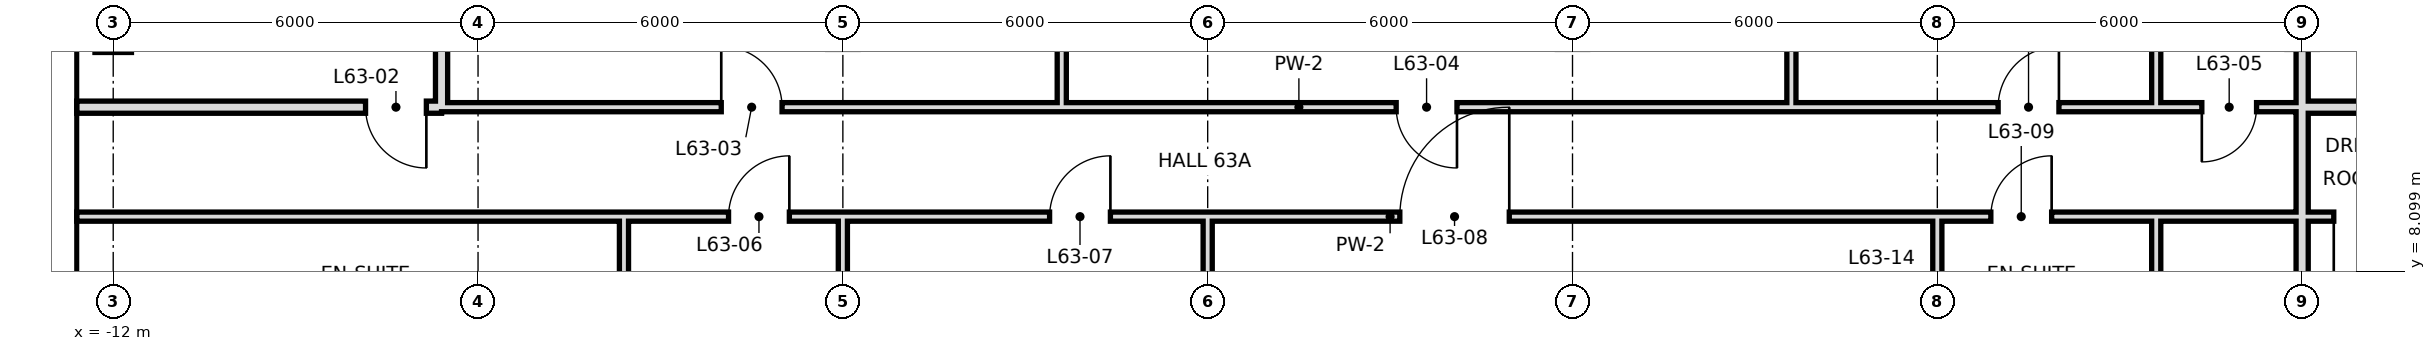
"""IFC4 building model, lengths in metres.
Left out: names, types, materials, properties, quantities, classifications, styles, units other than length and angle.
Written with IfcOpenShell. Run it as: python <this file> out.ifc"""

import sys

from ifc_helpers import new_model, si_unit, direction, frame, frame_2d, origin, place, context, subcontext, project, spatial, rectangle, extrude, element, fill, save


model = new_model("IFC4")
c1 = context("Model", 3, precision=1e-05, world=origin(), true_north=direction((0.0, 1.0)))
c2 = subcontext(c1, "Body", "Model", "MODEL_VIEW")
j1 = project(units=[si_unit("LENGTHUNIT", "METRE"), si_unit("PLANEANGLEUNIT", "RADIAN")], contexts=[c1])
p1 = place(None, origin())
s1 = spatial("IfcSite", under=j1, at=p1, CompositionType="ELEMENT")
p2 = place(p1, origin())
s2 = spatial("IfcBuilding", under=s1, at=p2, CompositionType="ELEMENT")
p3 = place(p2, frame((0.0, 0.0, 266.6)))
s3 = spatial("IfcBuildingStorey", under=s2, at=p3, CompositionType="ELEMENT", Elevation=266.6)
p4 = place(p3, frame((-3.6, 6.0, 0.0), z_axis=(0.0, 0.0, 1.0), x_axis=(0.0, 1.0, 0.0)))
e1 = element("IfcWall", 1, at=p4, inside=s3, PredefinedType="PARTITIONING", context=c2, shape_type="SweptSolid", body=[
    extrude(rectangle(XDim=3.0, YDim=0.15, at=frame_2d((1.5, 0.0))), origin(), (0.0, 0.0, 1.0), 3.42),
])
p5 = place(p3, frame((-6.6, 10.8, 0.0), z_axis=(0.0, 0.0, 1.0), x_axis=(0.0, 1.0, 0.0)))
e2 = element("IfcWall", 2, at=p5, inside=s3, PredefinedType="SOLIDWALL", context=c2, shape_type="SweptSolid", body=[
    extrude(rectangle(XDim=7.2, YDim=0.2, at=frame_2d((3.6, 0.0))), origin(), (0.0, 0.0, 1.0), 2.72),
])
p6 = place(p3, frame((0.0, 0.0, 0.0), z_axis=(0.0, 0.0, 1.0), x_axis=(0.0, 1.0, 0.0)))
e3 = element("IfcWall", 3, at=p6, inside=s3, PredefinedType="PARTITIONING", context=c2, shape_type="SweptSolid", body=[
    extrude(rectangle(XDim=9.0, YDim=0.15, at=frame_2d((4.5, 0.0))), origin(), (0.0, 0.0, 1.0), 2.72),
])
p7 = place(p3, frame((15.6, 10.8, 0.0), z_axis=(0.0, 0.0, 1.0), x_axis=(0.0, 1.0, 0.0)))
e4 = element("IfcWall", 4, at=p7, inside=s3, PredefinedType="PARTITIONING", context=c2, shape_type="SweptSolid", body=[
    extrude(rectangle(XDim=7.9, YDim=0.15, at=frame_2d((3.95, 0.0))), origin(), (0.0, 0.0, 1.0), 3.42),
])
p8 = place(p3, frame((18.0, -0.6, 0.0), z_axis=(0.0, 0.0, 1.0), x_axis=(0.0, 1.0, 0.0)))
e5 = element("IfcWall", 5, at=p8, inside=s3, PredefinedType="PARTITIONING", context=c2, shape_type="SweptSolid", body=[
    extrude(rectangle(XDim=9.6, YDim=0.15, at=frame_2d((4.8, 0.0))), origin(), (0.0, 0.0, 1.0), 2.72),
])
p9 = place(p3, frame((21.6, 6.0, 0.0), z_axis=(0.0, 0.0, 1.0), x_axis=(0.0, 1.0, 0.0)))
e6 = element("IfcWall", 6, at=p9, inside=s3, PredefinedType="PARTITIONING", context=c2, shape_type="SweptSolid", body=[
    extrude(rectangle(XDim=3.0, YDim=0.15, at=frame_2d((1.5, 0.0))), origin(), (0.0, 0.0, 1.0), 3.42),
])
p10 = place(p3, frame((21.6, 10.8, 0.0), z_axis=(0.0, 0.0, 1.0), x_axis=(0.0, 1.0, 0.0)))
e7 = element("IfcWall", 7, at=p10, inside=s3, PredefinedType="PARTITIONING", context=c2, shape_type="SweptSolid", body=[
    extrude(rectangle(XDim=7.9, YDim=0.15, at=frame_2d((3.95, 0.0))), origin(), (0.0, 0.0, 1.0), 3.42),
])
p11 = place(p3, frame((24.0, 10.8, 0.0), z_axis=(0.0, 0.0, 1.0), x_axis=(0.0, 1.0, 0.0)))
e8 = element("IfcWall", 8, at=p11, inside=s3, PredefinedType="SOLIDWALL", context=c2, shape_type="SweptSolid", body=[
    extrude(rectangle(XDim=7.9, YDim=0.2, at=frame_2d((3.95, 0.0))), origin(), (0.0, 0.0, 1.0), 2.72),
])
p12 = place(p3, frame((24.0, 0.0, 0.0), z_axis=(0.0, 0.0, 1.0), x_axis=(0.0, 1.0, 0.0)))
e9 = element("IfcWall", 9, at=p12, inside=s3, PredefinedType="SOLIDWALL", context=c2, shape_type="SweptSolid", body=[
    extrude(rectangle(XDim=10.8, YDim=0.2, at=frame_2d((5.4, 0.0))), origin(), (0.0, 0.0, 1.0), 2.72),
])
p13 = place(p3, frame((3.6, 10.8, 0.0), z_axis=(0.0, 0.0, 1.0), x_axis=(0.0, 1.0, 0.0)))
e10 = element("IfcWall", 10, at=p13, inside=s3, PredefinedType="PARTITIONING", context=c2, shape_type="SweptSolid", body=[
    extrude(rectangle(XDim=7.9, YDim=0.15, at=frame_2d((3.95, 0.0))), origin(), (0.0, 0.0, 1.0), 3.42),
])
p14 = place(p3, frame((6.0, -0.6, 0.0), z_axis=(0.0, 0.0, 1.0), x_axis=(0.0, 1.0, 0.0)))
e11 = element("IfcWall", 11, at=p14, inside=s3, PredefinedType="PARTITIONING", context=c2, shape_type="SweptSolid", body=[
    extrude(rectangle(XDim=9.6, YDim=0.15, at=frame_2d((4.8, 0.0))), origin(), (0.0, 0.0, 1.0), 2.72),
])
p15 = place(p3, frame((-12.6, 10.8, 0.0), z_axis=(0.0, 0.0, 1.0), x_axis=(1.0, 0.0, 0.0)))
e12 = element("IfcWall", 12, at=p15, inside=s3, PredefinedType="SOLIDWALL", context=c2, shape_type="SweptSolid", body=[
    extrude(rectangle(XDim=6.0, YDim=0.2, at=frame_2d((3.0, 0.0))), origin(), (0.0, 0.0, 1.0), 2.97),
])
p16 = place(p15, frame((4.75, 0.0, 0.0)))
e13 = element("IfcOpeningElement", 13, at=p16, cuts=e12, PredefinedType="OPENING", context=c2, shape_type="SweptSolid", body=[
    extrude(rectangle(XDim=1.0, YDim=2.4, at=frame_2d((0.5, 1.2))), frame((0.0, 0.11, 0.0), z_axis=(0.0, -1.0, 0.0), x_axis=(1.0, 0.0, 0.0)), (0.0, 0.0, 1.0), 0.22),
])
p17 = place(p3, frame((24.0, 10.8, 0.0), z_axis=(0.0, 0.0, 1.0), x_axis=(1.0, 0.0, 0.0)))
e14 = element("IfcWall", 14, at=p17, inside=s3, PredefinedType="SOLIDWALL", context=c2, shape_type="SweptSolid", body=[
    extrude(rectangle(XDim=3.6, YDim=0.2, at=frame_2d((1.8, 0.0))), origin(), (0.0, 0.0, 1.0), 2.72),
])
p18 = place(p17, frame((1.3, 0.0, 0.0)))
e15 = element("IfcOpeningElement", 15, at=p18, cuts=e14, PredefinedType="OPENING", context=c2, shape_type="SweptSolid", body=[
    extrude(rectangle(XDim=1.0, YDim=2.4, at=frame_2d((0.5, 1.2))), frame((0.0, 0.11, 0.0), z_axis=(0.0, -1.0, 0.0), x_axis=(1.0, 0.0, 0.0)), (0.0, 0.0, 1.0), 0.22),
])
p19 = place(p3, frame((-6.6, 10.8, 0.0), z_axis=(0.0, 0.0, 1.0), x_axis=(1.0, 0.0, 0.0)))
e16 = element("IfcWall", 16, at=p19, inside=s3, PredefinedType="PARTITIONING", context=c2, shape_type="SweptSolid", body=[
    extrude(rectangle(XDim=28.2, YDim=0.15, at=frame_2d((14.1, 0.0))), origin(), (0.0, 0.0, 1.0), 3.42),
])
p20 = place(p19, frame((25.6, 0.0, 0.0)))
e17 = element("IfcOpeningElement", 17, at=p20, cuts=e16, PredefinedType="OPENING", context=c2, shape_type="SweptSolid", body=[
    extrude(rectangle(XDim=1.0, YDim=2.4, at=frame_2d((0.5, 1.2))), frame((0.0, 0.085, 0.0), z_axis=(0.0, -1.0, 0.0), x_axis=(1.0, 0.0, 0.0)), (0.0, 0.0, 1.0), 0.17),
])
p21 = place(p19, frame((4.6, 0.0, 0.0)))
e18 = element("IfcOpeningElement", 18, at=p21, cuts=e16, PredefinedType="OPENING", context=c2, shape_type="SweptSolid", body=[
    extrude(rectangle(XDim=1.0, YDim=2.4, at=frame_2d((0.5, 1.2))), frame((0.0, 0.085, 0.0), z_axis=(0.0, -1.0, 0.0), x_axis=(1.0, 0.0, 0.0)), (0.0, 0.0, 1.0), 0.17),
])
p22 = place(p19, frame((15.7, 0.0, 0.0)))
e19 = element("IfcOpeningElement", 19, at=p22, cuts=e16, PredefinedType="OPENING", context=c2, shape_type="SweptSolid", body=[
    extrude(rectangle(XDim=1.0, YDim=2.4, at=frame_2d((0.5, 1.2))), frame((0.0, 0.085, 0.0), z_axis=(0.0, -1.0, 0.0), x_axis=(1.0, 0.0, 0.0)), (0.0, 0.0, 1.0), 0.17),
])
p23 = place(p3, frame((21.6, 10.8, 0.0), z_axis=(0.0, 0.0, 1.0), x_axis=(1.0, 0.0, 0.0)))
e20 = element("IfcWall", 20, at=p23, inside=s3, PredefinedType="PARTITIONING", context=c2, shape_type="SweptSolid", body=[
    extrude(rectangle(XDim=2.4, YDim=0.15, at=frame_2d((1.2, 0.0))), origin(), (0.0, 0.0, 1.0), 3.42),
])
p24 = place(p23, frame((0.75, 0.0, 0.0)))
e21 = element("IfcOpeningElement", 21, at=p24, cuts=e20, PredefinedType="OPENING", context=c2, shape_type="SweptSolid", body=[
    extrude(rectangle(XDim=0.9, YDim=2.4, at=frame_2d((0.45, 1.2))), frame((0.0, 0.085, 0.0), z_axis=(0.0, -1.0, 0.0), x_axis=(1.0, 0.0, 0.0)), (0.0, 0.0, 1.0), 0.17),
])
p25 = place(p3, frame((-3.6, 9.0, 0.0), z_axis=(0.0, 0.0, 1.0), x_axis=(1.0, 0.0, 0.0)))
e22 = element("IfcWall", 22, at=p25, inside=s3, PredefinedType="PARTITIONING", context=c2, shape_type="SweptSolid", body=[
    extrude(rectangle(XDim=25.2, YDim=0.15, at=frame_2d((12.6, 0.0))), origin(), (0.0, 0.0, 1.0), 3.42),
])
p26 = place(p25, frame((1.72, 0.0, 0.0)))
e23 = element("IfcOpeningElement", 23, at=p26, cuts=e22, PredefinedType="OPENING", context=c2, shape_type="SweptSolid", body=[
    extrude(rectangle(XDim=1.0, YDim=2.4, at=frame_2d((0.5, 1.2))), frame((0.0, 0.085, 0.0), z_axis=(0.0, -1.0, 0.0), x_axis=(1.0, 0.0, 0.0)), (0.0, 0.0, 1.0), 0.17),
])
p27 = place(p25, frame((7.0, 0.0, 0.0)))
e24 = element("IfcOpeningElement", 24, at=p27, cuts=e22, PredefinedType="OPENING", context=c2, shape_type="SweptSolid", body=[
    extrude(rectangle(XDim=1.0, YDim=2.4, at=frame_2d((0.5, 1.2))), frame((0.0, 0.085, 0.0), z_axis=(0.0, -1.0, 0.0), x_axis=(1.0, 0.0, 0.0)), (0.0, 0.0, 1.0), 0.17),
])
p28 = place(p25, frame((12.76, 0.0, 0.0)))
e25 = element("IfcOpeningElement", 25, at=p28, cuts=e22, PredefinedType="OPENING", context=c2, shape_type="SweptSolid", body=[
    extrude(rectangle(XDim=1.8, YDim=2.4, at=frame_2d((0.9, 1.2))), frame((0.0, 0.085, 0.0), z_axis=(0.0, -1.0, 0.0), x_axis=(1.0, 0.0, 0.0)), (0.0, 0.0, 1.0), 0.17),
])
p29 = place(p25, frame((22.48, 0.0, 0.0)))
e26 = element("IfcOpeningElement", 26, at=p29, cuts=e22, PredefinedType="OPENING", context=c2, shape_type="SweptSolid", body=[
    extrude(rectangle(XDim=1.0, YDim=2.4, at=frame_2d((0.5, 1.2))), frame((0.0, 0.085, 0.0), z_axis=(0.0, -1.0, 0.0), x_axis=(1.0, 0.0, 0.0)), (0.0, 0.0, 1.0), 0.17),
])
p30 = place(p3, frame((24.0, 9.0, 0.0), z_axis=(0.0, 0.0, 1.0), x_axis=(1.0, 0.0, 0.0)))
e27 = element("IfcWall", 27, at=p30, inside=s3, PredefinedType="PARTITIONING", context=c2, shape_type="SweptSolid", body=[
    extrude(rectangle(XDim=2.4, YDim=0.15, at=frame_2d((1.2, 0.0))), origin(), (0.0, 0.0, 1.0), 3.42),
])
p31 = place(p30, frame((0.52, 0.0, 0.0)))
e28 = element("IfcOpeningElement", 28, at=p31, cuts=e27, PredefinedType="OPENING", context=c2, shape_type="SweptSolid", body=[
    extrude(rectangle(XDim=1.0, YDim=2.4, at=frame_2d((0.5, 1.2))), frame((0.0, 0.085, 0.0), z_axis=(0.0, -1.0, 0.0), x_axis=(1.0, 0.0, 0.0)), (0.0, 0.0, 1.0), 0.17),
])
p32 = place(p3, frame((-12.6, 9.0, 0.0), z_axis=(0.0, 0.0, 1.0), x_axis=(1.0, 0.0, 0.0)))
e29 = element("IfcWall", 29, at=p32, inside=s3, PredefinedType="PARTITIONING", context=c2, shape_type="SweptSolid", body=[
    extrude(rectangle(XDim=9.0, YDim=0.15, at=frame_2d((4.5, 0.0))), origin(), (0.0, 0.0, 1.0), 3.42),
])
p33 = place(p3, frame((21.6, 9.0, 0.0), z_axis=(0.0, 0.0, 1.0), x_axis=(1.0, 0.0, 0.0)))
e30 = element("IfcWall", 30, at=p33, inside=s3, PredefinedType="PARTITIONING", context=c2, shape_type="SweptSolid", body=[
    extrude(rectangle(XDim=2.4, YDim=0.15, at=frame_2d((1.2, 0.0))), origin(), (0.0, 0.0, 1.0), 3.42),
])
p34 = place(p20, frame((1.0, 0.0, 0.0), z_axis=(0.0, 0.0, 1.0), x_axis=(-1.0, 0.0, 0.0)))
e31 = element("IfcDoor", 31, at=p34, inside=s3, OperationType="SINGLE_SWING_LEFT", PredefinedType="DOOR", context=c2, shape_type="SweptSolid", body=[
    extrude(rectangle(XDim=1.0, YDim=2.4, at=frame_2d((0.5, 1.2))), frame((0.0, 0.025, 0.0), z_axis=(0.0, -1.0, 0.0), x_axis=(1.0, 0.0, 0.0)), (0.0, 0.0, 1.0), 0.05),
])
fill(e17, e31)
p35 = place(p16, origin())
e32 = element("IfcDoor", 32, at=p35, inside=s3, OperationType="SINGLE_SWING_RIGHT", PredefinedType="DOOR", context=c2, shape_type="SweptSolid", body=[
    extrude(rectangle(XDim=1.0, YDim=2.4, at=frame_2d((0.5, 1.2))), frame((0.0, 0.025, 0.0), z_axis=(0.0, -1.0, 0.0), x_axis=(1.0, 0.0, 0.0)), (0.0, 0.0, 1.0), 0.05),
])
fill(e13, e32)
p36 = place(p21, origin())
e33 = element("IfcDoor", 33, at=p36, inside=s3, OperationType="SINGLE_SWING_LEFT", PredefinedType="DOOR", context=c2, shape_type="SweptSolid", body=[
    extrude(rectangle(XDim=1.0, YDim=2.4, at=frame_2d((0.5, 1.2))), frame((0.0, 0.025, 0.0), z_axis=(0.0, -1.0, 0.0), x_axis=(1.0, 0.0, 0.0)), (0.0, 0.0, 1.0), 0.05),
])
fill(e18, e33)
p37 = place(p22, origin())
e34 = element("IfcDoor", 34, at=p37, inside=s3, OperationType="SINGLE_SWING_RIGHT", PredefinedType="DOOR", context=c2, shape_type="SweptSolid", body=[
    extrude(rectangle(XDim=1.0, YDim=2.4, at=frame_2d((0.5, 1.2))), frame((0.0, 0.025, 0.0), z_axis=(0.0, -1.0, 0.0), x_axis=(1.0, 0.0, 0.0)), (0.0, 0.0, 1.0), 0.05),
])
fill(e19, e34)
p38 = place(p24, frame((0.9, 0.0, 0.0), z_axis=(0.0, 0.0, 1.0), x_axis=(-1.0, 0.0, 0.0)))
e35 = element("IfcDoor", 35, at=p38, inside=s3, OperationType="SINGLE_SWING_RIGHT", PredefinedType="DOOR", context=c2, shape_type="SweptSolid", body=[
    extrude(rectangle(XDim=0.9, YDim=2.4, at=frame_2d((0.45, 1.2))), frame((0.0, 0.025, 0.0), z_axis=(0.0, -1.0, 0.0), x_axis=(1.0, 0.0, 0.0)), (0.0, 0.0, 1.0), 0.05),
])
fill(e21, e35)
p39 = place(p26, frame((1.0, 0.0, 0.0), z_axis=(0.0, 0.0, 1.0), x_axis=(-1.0, 0.0, 0.0)))
e36 = element("IfcDoor", 36, at=p39, inside=s3, OperationType="SINGLE_SWING_LEFT", PredefinedType="DOOR", context=c2, shape_type="SweptSolid", body=[
    extrude(rectangle(XDim=1.0, YDim=2.4, at=frame_2d((0.5, 1.2))), frame((0.0, 0.025, 0.0), z_axis=(0.0, -1.0, 0.0), x_axis=(1.0, 0.0, 0.0)), (0.0, 0.0, 1.0), 0.05),
])
fill(e23, e36)
p40 = place(p27, frame((1.0, 0.0, 0.0), z_axis=(0.0, 0.0, 1.0), x_axis=(-1.0, 0.0, 0.0)))
e37 = element("IfcDoor", 37, at=p40, inside=s3, OperationType="SINGLE_SWING_LEFT", PredefinedType="DOOR", context=c2, shape_type="SweptSolid", body=[
    extrude(rectangle(XDim=1.0, YDim=2.4, at=frame_2d((0.5, 1.2))), frame((0.0, 0.025, 0.0), z_axis=(0.0, -1.0, 0.0), x_axis=(1.0, 0.0, 0.0)), (0.0, 0.0, 1.0), 0.05),
])
fill(e24, e37)
p41 = place(p28, frame((1.8, 0.0, 0.0), z_axis=(0.0, 0.0, 1.0), x_axis=(-1.0, 0.0, 0.0)))
e38 = element("IfcDoor", 38, at=p41, inside=s3, OperationType="SINGLE_SWING_LEFT", PredefinedType="DOOR", context=c2, shape_type="SweptSolid", body=[
    extrude(rectangle(XDim=1.8, YDim=2.4, at=frame_2d((0.9, 1.2))), frame((0.0, 0.025, 0.0), z_axis=(0.0, -1.0, 0.0), x_axis=(1.0, 0.0, 0.0)), (0.0, 0.0, 1.0), 0.05),
])
fill(e25, e38)
p42 = place(p29, frame((1.0, 0.0, 0.0), z_axis=(0.0, 0.0, 1.0), x_axis=(-1.0, 0.0, 0.0)))
e39 = element("IfcDoor", 39, at=p42, inside=s3, OperationType="SINGLE_SWING_LEFT", PredefinedType="DOOR", context=c2, shape_type="SweptSolid", body=[
    extrude(rectangle(XDim=1.0, YDim=2.4, at=frame_2d((0.5, 1.2))), frame((0.0, 0.025, 0.0), z_axis=(0.0, -1.0, 0.0), x_axis=(1.0, 0.0, 0.0)), (0.0, 0.0, 1.0), 0.05),
])
fill(e26, e39)
p43 = place(p31, frame((1.0, 0.0, 0.0), z_axis=(0.0, 0.0, 1.0), x_axis=(-1.0, 0.0, 0.0)))
e40 = element("IfcDoor", 40, at=p43, inside=s3, OperationType="SINGLE_SWING_RIGHT", PredefinedType="DOOR", context=c2, shape_type="SweptSolid", body=[
    extrude(rectangle(XDim=1.0, YDim=2.4, at=frame_2d((0.5, 1.2))), frame((0.0, 0.025, 0.0), z_axis=(0.0, -1.0, 0.0), x_axis=(1.0, 0.0, 0.0)), (0.0, 0.0, 1.0), 0.05),
])
fill(e28, e40)
save(model, sys.argv[1])
